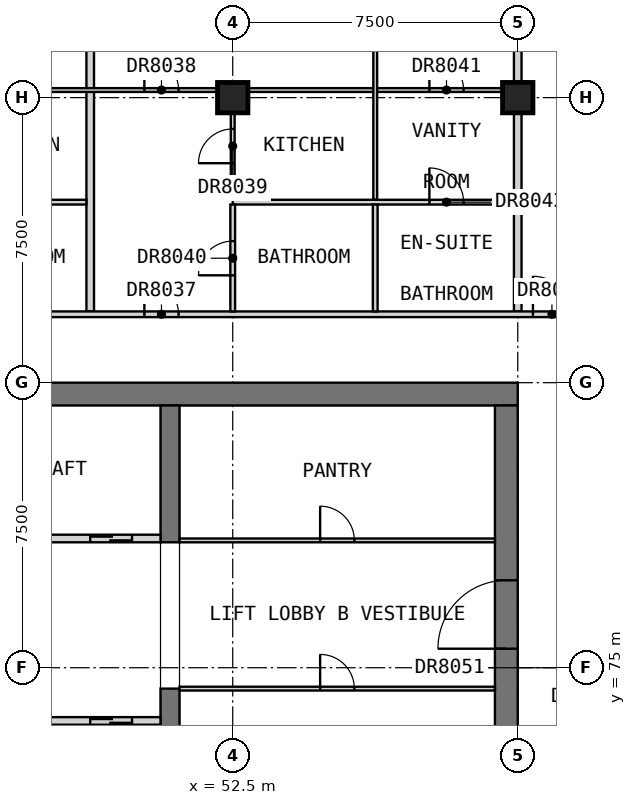
"""IFC4 building model, lengths in metres.
Left out: names, types, materials, properties, quantities, classifications, styles, units other than length and angle.
Written with IfcOpenShell. Run it as: python <this file> out.ifc"""

import sys

from ifc_helpers import new_model, si_unit, direction, frame, frame_2d, origin, origin_2d, place, context, subcontext, project, spatial, rectangle, extrude, element, fill, save


model = new_model("IFC4")
c1 = context("Model", 3, precision=1e-05, world=origin(), true_north=direction((0.0, 1.0)))
c2 = subcontext(c1, "Body", "Model", "MODEL_VIEW")
j1 = project(units=[si_unit("LENGTHUNIT", "METRE"), si_unit("PLANEANGLEUNIT", "RADIAN")], contexts=[c1])
p1 = place(None, origin())
s1 = spatial("IfcSite", under=j1, at=p1, CompositionType="ELEMENT")
p2 = place(p1, origin())
s2 = spatial("IfcBuilding", under=s1, at=p2, CompositionType="ELEMENT")
p3 = place(p2, frame((0.0, 0.0, 233.7)))
s3 = spatial("IfcBuildingStorey", under=s2, at=p3, CompositionType="ELEMENT", Elevation=233.7)
for number, where, z_axis, x_axis in (
    (1, (52.5, 90.0, 0.0), (0.0, 0.0, 1.0), (1.0, 0.0, 0.0)),
    (2, (60.0, 90.0, 0.0), (0.0, 0.0, 1.0), (1.0, 0.0, 0.0)),
):
    element("IfcColumn", number, at=place(p3, frame(where, z_axis=z_axis, x_axis=x_axis)), inside=s3, PredefinedType="COLUMN", context=c2, shape_type="SweptSolid", body=[
        extrude(rectangle(XDim=0.8, YDim=0.8, at=origin_2d()), origin(), (0.0, 0.0, 1.0), 3.5),
    ])
p4 = place(p3, frame((30.0, 82.2, 0.0), z_axis=(0.0, 0.0, 1.0), x_axis=(1.0, 0.0, 0.0)))
e3 = element("IfcWall", 3, at=p4, inside=s3, PredefinedType="SHEAR", context=c2, shape_type="SweptSolid", body=[
    extrude(rectangle(XDim=30.0, YDim=0.6, at=frame_2d((15.0, 0.0))), origin(), (0.0, 0.0, 1.0), 3.5),
])
p5 = place(p3, frame((59.7, 60.6, 0.0), z_axis=(0.0, 0.0, 1.0), x_axis=(0.0, 1.0, 0.0)))
e4 = element("IfcWall", 4, at=p5, inside=s3, PredefinedType="SHEAR", context=c2, shape_type="SweptSolid", body=[
    extrude(rectangle(XDim=21.3, YDim=0.6, at=frame_2d((10.65, 0.0))), origin(), (0.0, 0.0, 1.0), 3.5),
])
p6 = place(p5, frame((14.9, 0.0, 0.0)))
e5 = element("IfcOpeningElement", 5, at=p6, cuts=e4, PredefinedType="OPENING", context=c2, shape_type="SweptSolid", body=[
    extrude(rectangle(XDim=1.8, YDim=2.1, at=frame_2d((0.9, 1.05))), frame((0.0, 0.31, 0.0), z_axis=(0.0, -1.0, 0.0), x_axis=(1.0, 0.0, 0.0)), (0.0, 0.0, 1.0), 0.62),
])
p7 = place(p3, frame((50.85, 68.05, 0.0), z_axis=(0.0, 0.0, 1.0), x_axis=(0.0, 1.0, 0.0)))
e6 = element("IfcWall", 6, at=p7, inside=s3, PredefinedType="SHEAR", context=c2, shape_type="SweptSolid", body=[
    extrude(rectangle(XDim=6.4, YDim=0.5, at=frame_2d((3.2, 0.0))), origin(), (0.0, 0.0, 1.0), 3.5),
])
p8 = place(p3, frame((50.85, 78.3, 0.0), z_axis=(0.0, 0.0, 1.0), x_axis=(0.0, 1.0, 0.0)))
e7 = element("IfcWall", 7, at=p8, inside=s3, PredefinedType="SHEAR", context=c2, shape_type="SweptSolid", body=[
    extrude(rectangle(XDim=3.6, YDim=0.5, at=frame_2d((1.8, 0.0))), origin(), (0.0, 0.0, 1.0), 3.5),
])
p9 = place(p3, frame((35.0, 73.6, 0.0), z_axis=(0.0, 0.0, 1.0), x_axis=(1.0, 0.0, 0.0)))
e8 = element("IfcWall", 8, at=p9, inside=s3, PredefinedType="SOLIDWALL", context=c2, shape_type="SweptSolid", body=[
    extrude(rectangle(XDim=15.6, YDim=0.2, at=frame_2d((7.8, 0.0))), origin(), (0.0, 0.0, 1.0), 3.5),
])
p10 = place(p9, frame((0.75, 0.0, 0.0)))
e9 = element("IfcOpeningElement", 9, at=p10, cuts=e8, PredefinedType="OPENING", context=c2, shape_type="SweptSolid", body=[
    extrude(rectangle(XDim=1.1, YDim=2.1, at=frame_2d((0.55, 1.05))), frame((0.0, 0.11, 0.0), z_axis=(0.0, -1.0, 0.0), x_axis=(1.0, 0.0, 0.0)), (0.0, 0.0, 1.0), 0.22),
])
p11 = place(p9, frame((3.35, 0.0, 0.0)))
e10 = element("IfcOpeningElement", 10, at=p11, cuts=e8, PredefinedType="OPENING", context=c2, shape_type="SweptSolid", body=[
    extrude(rectangle(XDim=1.1, YDim=2.1, at=frame_2d((0.55, 1.05))), frame((0.0, 0.11, 0.0), z_axis=(0.0, -1.0, 0.0), x_axis=(1.0, 0.0, 0.0)), (0.0, 0.0, 1.0), 0.22),
])
p12 = place(p9, frame((5.95, 0.0, 0.0)))
e11 = element("IfcOpeningElement", 11, at=p12, cuts=e8, PredefinedType="OPENING", context=c2, shape_type="SweptSolid", body=[
    extrude(rectangle(XDim=1.1, YDim=2.1, at=frame_2d((0.55, 1.05))), frame((0.0, 0.11, 0.0), z_axis=(0.0, -1.0, 0.0), x_axis=(1.0, 0.0, 0.0)), (0.0, 0.0, 1.0), 0.22),
])
p13 = place(p9, frame((8.55, 0.0, 0.0)))
e12 = element("IfcOpeningElement", 12, at=p13, cuts=e8, PredefinedType="OPENING", context=c2, shape_type="SweptSolid", body=[
    extrude(rectangle(XDim=1.1, YDim=2.1, at=frame_2d((0.55, 1.05))), frame((0.0, 0.11, 0.0), z_axis=(0.0, -1.0, 0.0), x_axis=(1.0, 0.0, 0.0)), (0.0, 0.0, 1.0), 0.22),
])
p14 = place(p9, frame((11.15, 0.0, 0.0)))
e13 = element("IfcOpeningElement", 13, at=p14, cuts=e8, PredefinedType="OPENING", context=c2, shape_type="SweptSolid", body=[
    extrude(rectangle(XDim=1.1, YDim=2.1, at=frame_2d((0.55, 1.05))), frame((0.0, 0.11, 0.0), z_axis=(0.0, -1.0, 0.0), x_axis=(1.0, 0.0, 0.0)), (0.0, 0.0, 1.0), 0.22),
])
p15 = place(p9, frame((13.75, 0.0, 0.0)))
e14 = element("IfcOpeningElement", 14, at=p15, cuts=e8, PredefinedType="OPENING", context=c2, shape_type="SweptSolid", body=[
    extrude(rectangle(XDim=1.1, YDim=2.1, at=frame_2d((0.55, 1.05))), frame((0.0, 0.11, 0.0), z_axis=(0.0, -1.0, 0.0), x_axis=(1.0, 0.0, 0.0)), (0.0, 0.0, 1.0), 0.22),
])
p16 = place(p3, frame((35.0, 78.4, 0.0), z_axis=(0.0, 0.0, 1.0), x_axis=(1.0, 0.0, 0.0)))
e15 = element("IfcWall", 15, at=p16, inside=s3, PredefinedType="SOLIDWALL", context=c2, shape_type="SweptSolid", body=[
    extrude(rectangle(XDim=15.6, YDim=0.2, at=frame_2d((7.8, 0.0))), origin(), (0.0, 0.0, 1.0), 3.5),
])
p17 = place(p16, frame((0.75, 0.0, 0.0)))
e16 = element("IfcOpeningElement", 16, at=p17, cuts=e15, PredefinedType="OPENING", context=c2, shape_type="SweptSolid", body=[
    extrude(rectangle(XDim=1.1, YDim=2.1, at=frame_2d((0.55, 1.05))), frame((0.0, 0.11, 0.0), z_axis=(0.0, -1.0, 0.0), x_axis=(1.0, 0.0, 0.0)), (0.0, 0.0, 1.0), 0.22),
])
p18 = place(p16, frame((3.35, 0.0, 0.0)))
e17 = element("IfcOpeningElement", 17, at=p18, cuts=e15, PredefinedType="OPENING", context=c2, shape_type="SweptSolid", body=[
    extrude(rectangle(XDim=1.1, YDim=2.1, at=frame_2d((0.55, 1.05))), frame((0.0, 0.11, 0.0), z_axis=(0.0, -1.0, 0.0), x_axis=(1.0, 0.0, 0.0)), (0.0, 0.0, 1.0), 0.22),
])
p19 = place(p16, frame((11.15, 0.0, 0.0)))
e18 = element("IfcOpeningElement", 18, at=p19, cuts=e15, PredefinedType="OPENING", context=c2, shape_type="SweptSolid", body=[
    extrude(rectangle(XDim=1.1, YDim=2.1, at=frame_2d((0.55, 1.05))), frame((0.0, 0.11, 0.0), z_axis=(0.0, -1.0, 0.0), x_axis=(1.0, 0.0, 0.0)), (0.0, 0.0, 1.0), 0.22),
])
p20 = place(p16, frame((13.75, 0.0, 0.0)))
e19 = element("IfcOpeningElement", 19, at=p20, cuts=e15, PredefinedType="OPENING", context=c2, shape_type="SweptSolid", body=[
    extrude(rectangle(XDim=1.1, YDim=2.1, at=frame_2d((0.55, 1.05))), frame((0.0, 0.11, 0.0), z_axis=(0.0, -1.0, 0.0), x_axis=(1.0, 0.0, 0.0)), (0.0, 0.0, 1.0), 0.22),
])
p21 = place(p3, frame((51.1, 74.45, 0.0), z_axis=(0.0, 0.0, 1.0), x_axis=(1.0, 0.0, 0.0)))
e20 = element("IfcWall", 20, at=p21, inside=s3, PredefinedType="PARTITIONING", context=c2, shape_type="SweptSolid", body=[
    extrude(rectangle(XDim=8.3, YDim=0.1, at=frame_2d((4.15, 0.0))), origin(), (0.0, 0.0, 1.0), 3.25),
])
p22 = place(p21, frame((3.7, 0.0, 0.0)))
e21 = element("IfcOpeningElement", 21, at=p22, cuts=e20, PredefinedType="OPENING", context=c2, shape_type="SweptSolid", body=[
    extrude(rectangle(XDim=0.9, YDim=2.1, at=frame_2d((0.45, 1.05))), frame((0.0, 0.06, 0.0), z_axis=(0.0, -1.0, 0.0), x_axis=(1.0, 0.0, 0.0)), (0.0, 0.0, 1.0), 0.12),
])
p23 = place(p3, frame((51.1, 78.35, 0.0), z_axis=(0.0, 0.0, 1.0), x_axis=(1.0, 0.0, 0.0)))
e22 = element("IfcWall", 22, at=p23, inside=s3, PredefinedType="PARTITIONING", context=c2, shape_type="SweptSolid", body=[
    extrude(rectangle(XDim=8.3, YDim=0.1, at=frame_2d((4.15, 0.0))), origin(), (0.0, 0.0, 1.0), 3.25),
])
p24 = place(p23, frame((3.7, 0.0, 0.0)))
e23 = element("IfcOpeningElement", 23, at=p24, cuts=e22, PredefinedType="OPENING", context=c2, shape_type="SweptSolid", body=[
    extrude(rectangle(XDim=0.9, YDim=2.1, at=frame_2d((0.45, 1.05))), frame((0.0, 0.06, 0.0), z_axis=(0.0, -1.0, 0.0), x_axis=(1.0, 0.0, 0.0)), (0.0, 0.0, 1.0), 0.12),
])
p25 = place(p3, frame((48.75, 84.375, 0.0), z_axis=(0.0, 0.0, 1.0), x_axis=(0.0, 1.0, 0.0)))
e24 = element("IfcWall", 24, at=p25, inside=s3, PredefinedType="PARTITIONING", context=c2, shape_type="SweptSolid", body=[
    extrude(rectangle(XDim=12.315, YDim=0.2, at=frame_2d((6.157, 0.0))), origin(), (0.0, 0.0, 1.0), 3.25),
])
p26 = place(p3, frame((60.0, 84.375, 0.0), z_axis=(0.0, 0.0, 1.0), x_axis=(0.0, 1.0, 0.0)))
e25 = element("IfcWall", 25, at=p26, inside=s3, PredefinedType="PARTITIONING", context=c2, shape_type="SweptSolid", body=[
    extrude(rectangle(XDim=13.125, YDim=0.2, at=frame_2d((6.562, 0.0))), origin(), (0.0, 0.0, 1.0), 3.25),
])
p27 = place(p3, frame((33.85, 84.3, 0.0), z_axis=(0.0, 0.0, 1.0), x_axis=(1.0, 0.0, 0.0)))
e26 = element("IfcWall", 26, at=p27, inside=s3, PredefinedType="PARTITIONING", context=c2, shape_type="SweptSolid", body=[
    extrude(rectangle(XDim=27.95, YDim=0.15, at=frame_2d((13.975, 0.0))), origin(), (0.0, 0.0, 1.0), 3.25),
])
p28 = place(p27, frame((1.325, 0.0, 0.0)))
e27 = element("IfcOpeningElement", 27, at=p28, cuts=e26, PredefinedType="OPENING", context=c2, shape_type="SweptSolid", body=[
    extrude(rectangle(XDim=0.9, YDim=2.1, at=frame_2d((0.45, 1.05))), frame((0.0, 0.085, 0.0), z_axis=(0.0, -1.0, 0.0), x_axis=(1.0, 0.0, 0.0)), (0.0, 0.0, 1.0), 0.17),
])
p29 = place(p27, frame((8.825, 0.0, 0.0)))
e28 = element("IfcOpeningElement", 28, at=p29, cuts=e26, PredefinedType="OPENING", context=c2, shape_type="SweptSolid", body=[
    extrude(rectangle(XDim=0.9, YDim=2.1, at=frame_2d((0.45, 1.05))), frame((0.0, 0.085, 0.0), z_axis=(0.0, -1.0, 0.0), x_axis=(1.0, 0.0, 0.0)), (0.0, 0.0, 1.0), 0.17),
])
p30 = place(p27, frame((16.325, 0.0, 0.0)))
e29 = element("IfcOpeningElement", 29, at=p30, cuts=e26, PredefinedType="OPENING", context=c2, shape_type="SweptSolid", body=[
    extrude(rectangle(XDim=0.9, YDim=2.1, at=frame_2d((0.45, 1.05))), frame((0.0, 0.085, 0.0), z_axis=(0.0, -1.0, 0.0), x_axis=(1.0, 0.0, 0.0)), (0.0, 0.0, 1.0), 0.17),
])
p31 = place(p27, frame((26.55, 0.0, 0.0)))
e30 = element("IfcOpeningElement", 30, at=p31, cuts=e26, PredefinedType="OPENING", context=c2, shape_type="SweptSolid", body=[
    extrude(rectangle(XDim=1.0, YDim=2.1, at=frame_2d((0.5, 1.05))), frame((0.0, 0.085, 0.0), z_axis=(0.0, -1.0, 0.0), x_axis=(1.0, 0.0, 0.0)), (0.0, 0.0, 1.0), 0.17),
])
p32 = place(p3, frame((33.85, 90.2, 0.0), z_axis=(0.0, 0.0, 1.0), x_axis=(1.0, 0.0, 0.0)))
e31 = element("IfcWall", 31, at=p32, inside=s3, PredefinedType="PARTITIONING", context=c2, shape_type="SweptSolid", body=[
    extrude(rectangle(XDim=26.05, YDim=0.1, at=frame_2d((13.025, 0.0))), origin(), (0.0, 0.0, 1.0), 3.25),
])
p33 = place(p32, frame((0.175, 0.0, 0.0)))
e32 = element("IfcOpeningElement", 32, at=p33, cuts=e31, PredefinedType="OPENING", context=c2, shape_type="SweptSolid", body=[
    extrude(rectangle(XDim=0.9, YDim=2.1, at=frame_2d((0.45, 1.05))), frame((0.0, 0.06, 0.0), z_axis=(0.0, -1.0, 0.0), x_axis=(1.0, 0.0, 0.0)), (0.0, 0.0, 1.0), 0.12),
])
p34 = place(p32, frame((8.825, 0.0, 0.0)))
e33 = element("IfcOpeningElement", 33, at=p34, cuts=e31, PredefinedType="OPENING", context=c2, shape_type="SweptSolid", body=[
    extrude(rectangle(XDim=0.9, YDim=2.1, at=frame_2d((0.45, 1.05))), frame((0.0, 0.06, 0.0), z_axis=(0.0, -1.0, 0.0), x_axis=(1.0, 0.0, 0.0)), (0.0, 0.0, 1.0), 0.12),
])
p35 = place(p32, frame((16.325, 0.0, 0.0)))
e34 = element("IfcOpeningElement", 34, at=p35, cuts=e31, PredefinedType="OPENING", context=c2, shape_type="SweptSolid", body=[
    extrude(rectangle(XDim=0.9, YDim=2.1, at=frame_2d((0.45, 1.05))), frame((0.0, 0.06, 0.0), z_axis=(0.0, -1.0, 0.0), x_axis=(1.0, 0.0, 0.0)), (0.0, 0.0, 1.0), 0.12),
])
p36 = place(p32, frame((23.825, 0.0, 0.0)))
e35 = element("IfcOpeningElement", 35, at=p36, cuts=e31, PredefinedType="OPENING", context=c2, shape_type="SweptSolid", body=[
    extrude(rectangle(XDim=0.9, YDim=2.1, at=frame_2d((0.45, 1.05))), frame((0.0, 0.06, 0.0), z_axis=(0.0, -1.0, 0.0), x_axis=(1.0, 0.0, 0.0)), (0.0, 0.0, 1.0), 0.12),
])
p37 = place(p3, frame((52.5, 87.312, 0.0), z_axis=(0.0, 0.0, 1.0), x_axis=(0.0, 1.0, 0.0)))
e36 = element("IfcWall", 36, at=p37, inside=s3, PredefinedType="PARTITIONING", context=c2, shape_type="SweptSolid", body=[
    extrude(rectangle(XDim=2.837, YDim=0.1, at=frame_2d((1.419, 0.0))), origin(), (0.0, 0.0, 1.0), 3.25),
])
p38 = place(p37, frame((0.962, 0.0, 0.0)))
e37 = element("IfcOpeningElement", 37, at=p38, cuts=e36, PredefinedType="OPENING", context=c2, shape_type="SweptSolid", body=[
    extrude(rectangle(XDim=0.9, YDim=2.1, at=frame_2d((0.45, 1.05))), frame((0.0, 0.06, 0.0), z_axis=(0.0, -1.0, 0.0), x_axis=(1.0, 0.0, 0.0)), (0.0, 0.0, 1.0), 0.12),
])
p39 = place(p3, frame((56.25, 87.312, 0.0), z_axis=(0.0, 0.0, 1.0), x_axis=(0.0, 1.0, 0.0)))
e38 = element("IfcWall", 38, at=p39, inside=s3, PredefinedType="PARTITIONING", context=c2, shape_type="SweptSolid", body=[
    extrude(rectangle(XDim=9.377, YDim=0.1, at=frame_2d((4.689, 0.0))), origin(), (0.0, 0.0, 1.0), 3.25),
])
p40 = place(p39, frame((6.087, 0.0, 0.0)))
e39 = element("IfcOpeningElement", 39, at=p40, cuts=e38, PredefinedType="OPENING", context=c2, shape_type="SweptSolid", body=[
    extrude(rectangle(XDim=0.9, YDim=2.1, at=frame_2d((0.45, 1.05))), frame((0.0, 0.06, 0.0), z_axis=(0.0, -1.0, 0.0), x_axis=(1.0, 0.0, 0.0)), (0.0, 0.0, 1.0), 0.12),
])
p41 = place(p3, frame((45.0, 87.25, 0.0), z_axis=(0.0, 0.0, 1.0), x_axis=(1.0, 0.0, 0.0)))
e40 = element("IfcWall", 40, at=p41, inside=s3, PredefinedType="PARTITIONING", context=c2, shape_type="SweptSolid", body=[
    extrude(rectangle(XDim=3.65, YDim=0.125, at=frame_2d((1.825, 0.0))), origin(), (0.0, 0.0, 1.0), 3.25),
])
p42 = place(p3, frame((52.5, 87.25, 0.0), z_axis=(0.0, 0.0, 1.0), x_axis=(1.0, 0.0, 0.0)))
e41 = element("IfcWall", 41, at=p42, inside=s3, PredefinedType="PARTITIONING", context=c2, shape_type="SweptSolid", body=[
    extrude(rectangle(XDim=7.4, YDim=0.125, at=frame_2d((3.7, 0.0))), origin(), (0.0, 0.0, 1.0), 3.25),
])
p43 = place(p42, frame((5.175, 0.0, 0.0)))
e42 = element("IfcOpeningElement", 42, at=p43, cuts=e41, PredefinedType="OPENING", context=c2, shape_type="SweptSolid", body=[
    extrude(rectangle(XDim=0.9, YDim=2.1, at=frame_2d((0.45, 1.05))), frame((0.0, 0.073, 0.0), z_axis=(0.0, -1.0, 0.0), x_axis=(1.0, 0.0, 0.0)), (0.0, 0.0, 1.0), 0.145),
])
p44 = place(p3, frame((52.5, 84.375, 0.0), z_axis=(0.0, 0.0, 1.0), x_axis=(0.0, 1.0, 0.0)))
e43 = element("IfcWall", 43, at=p44, inside=s3, PredefinedType="PARTITIONING", context=c2, shape_type="SweptSolid", body=[
    extrude(rectangle(XDim=2.812, YDim=0.125, at=frame_2d((1.406, 0.0))), origin(), (0.0, 0.0, 1.0), 3.25),
])
p45 = place(p44, frame((0.95, 0.0, 0.0)))
e44 = element("IfcOpeningElement", 44, at=p45, cuts=e43, PredefinedType="OPENING", context=c2, shape_type="SweptSolid", body=[
    extrude(rectangle(XDim=0.9, YDim=2.1, at=frame_2d((0.45, 1.05))), frame((0.0, 0.073, 0.0), z_axis=(0.0, -1.0, 0.0), x_axis=(1.0, 0.0, 0.0)), (0.0, 0.0, 1.0), 0.145),
])
p46 = place(p3, frame((56.25, 84.375, 0.0), z_axis=(0.0, 0.0, 1.0), x_axis=(0.0, 1.0, 0.0)))
e45 = element("IfcWall", 45, at=p46, inside=s3, PredefinedType="PARTITIONING", context=c2, shape_type="SweptSolid", body=[
    extrude(rectangle(XDim=2.812, YDim=0.125, at=frame_2d((1.406, 0.0))), origin(), (0.0, 0.0, 1.0), 3.25),
])
p47 = place(p15, origin())
e46 = element("IfcDoor", 46, at=p47, inside=s3, OperationType="DOUBLE_DOOR_SLIDING", PredefinedType="DOOR", context=c2, shape_type="SweptSolid", body=[
    extrude(rectangle(XDim=1.1, YDim=2.1, at=frame_2d((0.55, 1.05))), frame((0.0, 0.025, 0.0), z_axis=(0.0, -1.0, 0.0), x_axis=(1.0, 0.0, 0.0)), (0.0, 0.0, 1.0), 0.05),
])
fill(e14, e46)
p48 = place(p20, origin())
e47 = element("IfcDoor", 47, at=p48, inside=s3, OperationType="DOUBLE_DOOR_SLIDING", PredefinedType="DOOR", context=c2, shape_type="SweptSolid", body=[
    extrude(rectangle(XDim=1.1, YDim=2.1, at=frame_2d((0.55, 1.05))), frame((0.0, 0.025, 0.0), z_axis=(0.0, -1.0, 0.0), x_axis=(1.0, 0.0, 0.0)), (0.0, 0.0, 1.0), 0.05),
])
fill(e19, e47)
p49 = place(p6, origin())
e48 = element("IfcDoor", 48, at=p49, inside=s3, OperationType="DOUBLE_DOOR_SINGLE_SWING", PredefinedType="DOOR", context=c2, shape_type="SweptSolid", body=[
    extrude(rectangle(XDim=1.8, YDim=2.1, at=frame_2d((0.9, 1.05))), frame((0.0, 0.025, 0.0), z_axis=(0.0, -1.0, 0.0), x_axis=(1.0, 0.0, 0.0)), (0.0, 0.0, 1.0), 0.05),
])
fill(e5, e48)
p50 = place(p22, origin())
e49 = element("IfcDoor", 49, at=p50, inside=s3, OperationType="SINGLE_SWING_RIGHT", PredefinedType="DOOR", context=c2, shape_type="SweptSolid", body=[
    extrude(rectangle(XDim=0.9, YDim=2.1, at=frame_2d((0.45, 1.05))), frame((0.0, 0.025, 0.0), z_axis=(0.0, -1.0, 0.0), x_axis=(1.0, 0.0, 0.0)), (0.0, 0.0, 1.0), 0.05),
])
fill(e21, e49)
p51 = place(p24, origin())
e50 = element("IfcDoor", 50, at=p51, inside=s3, OperationType="SINGLE_SWING_RIGHT", PredefinedType="DOOR", context=c2, shape_type="SweptSolid", body=[
    extrude(rectangle(XDim=0.9, YDim=2.1, at=frame_2d((0.45, 1.05))), frame((0.0, 0.025, 0.0), z_axis=(0.0, -1.0, 0.0), x_axis=(1.0, 0.0, 0.0)), (0.0, 0.0, 1.0), 0.05),
])
fill(e23, e50)
p52 = place(p30, origin())
e51 = element("IfcDoor", 51, at=p52, inside=s3, OperationType="SINGLE_SWING_LEFT", PredefinedType="DOOR", context=c2, shape_type="SweptSolid", body=[
    extrude(rectangle(XDim=0.9, YDim=2.1, at=frame_2d((0.45, 1.05))), frame((0.0, 0.025, 0.0), z_axis=(0.0, -1.0, 0.0), x_axis=(1.0, 0.0, 0.0)), (0.0, 0.0, 1.0), 0.05),
])
fill(e29, e51)
p53 = place(p35, origin())
e52 = element("IfcDoor", 52, at=p53, inside=s3, OperationType="SINGLE_SWING_RIGHT", PredefinedType="DOOR", context=c2, shape_type="SweptSolid", body=[
    extrude(rectangle(XDim=0.9, YDim=2.1, at=frame_2d((0.45, 1.05))), frame((0.0, 0.025, 0.0), z_axis=(0.0, -1.0, 0.0), x_axis=(1.0, 0.0, 0.0)), (0.0, 0.0, 1.0), 0.05),
])
fill(e34, e52)
p54 = place(p38, origin())
e53 = element("IfcDoor", 53, at=p54, inside=s3, OperationType="SINGLE_SWING_RIGHT", PredefinedType="DOOR", context=c2, shape_type="SweptSolid", body=[
    extrude(rectangle(XDim=0.9, YDim=2.1, at=frame_2d((0.45, 1.05))), frame((0.0, 0.025, 0.0), z_axis=(0.0, -1.0, 0.0), x_axis=(1.0, 0.0, 0.0)), (0.0, 0.0, 1.0), 0.05),
])
fill(e37, e53)
p55 = place(p45, origin())
e54 = element("IfcDoor", 54, at=p55, inside=s3, OperationType="SINGLE_SWING_RIGHT", PredefinedType="DOOR", context=c2, shape_type="SweptSolid", body=[
    extrude(rectangle(XDim=0.9, YDim=2.1, at=frame_2d((0.45, 1.05))), frame((0.0, 0.025, 0.0), z_axis=(0.0, -1.0, 0.0), x_axis=(1.0, 0.0, 0.0)), (0.0, 0.0, 1.0), 0.05),
])
fill(e44, e54)
p56 = place(p36, origin())
e55 = element("IfcDoor", 55, at=p56, inside=s3, OperationType="SINGLE_SWING_RIGHT", PredefinedType="DOOR", context=c2, shape_type="SweptSolid", body=[
    extrude(rectangle(XDim=0.9, YDim=2.1, at=frame_2d((0.45, 1.05))), frame((0.0, 0.025, 0.0), z_axis=(0.0, -1.0, 0.0), x_axis=(1.0, 0.0, 0.0)), (0.0, 0.0, 1.0), 0.05),
])
fill(e35, e55)
p57 = place(p43, origin())
e56 = element("IfcDoor", 56, at=p57, inside=s3, OperationType="SINGLE_SWING_RIGHT", PredefinedType="DOOR", context=c2, shape_type="SweptSolid", body=[
    extrude(rectangle(XDim=0.9, YDim=2.1, at=frame_2d((0.45, 1.05))), frame((0.0, 0.025, 0.0), z_axis=(0.0, -1.0, 0.0), x_axis=(1.0, 0.0, 0.0)), (0.0, 0.0, 1.0), 0.05),
])
fill(e42, e56)
p58 = place(p31, origin())
e57 = element("IfcDoor", 57, at=p58, inside=s3, OperationType="SINGLE_SWING_LEFT", PredefinedType="DOOR", context=c2, shape_type="SweptSolid", body=[
    extrude(rectangle(XDim=1.0, YDim=2.1, at=frame_2d((0.5, 1.05))), frame((0.0, 0.025, 0.0), z_axis=(0.0, -1.0, 0.0), x_axis=(1.0, 0.0, 0.0)), (0.0, 0.0, 1.0), 0.05),
])
fill(e30, e57)
save(model, sys.argv[1])
